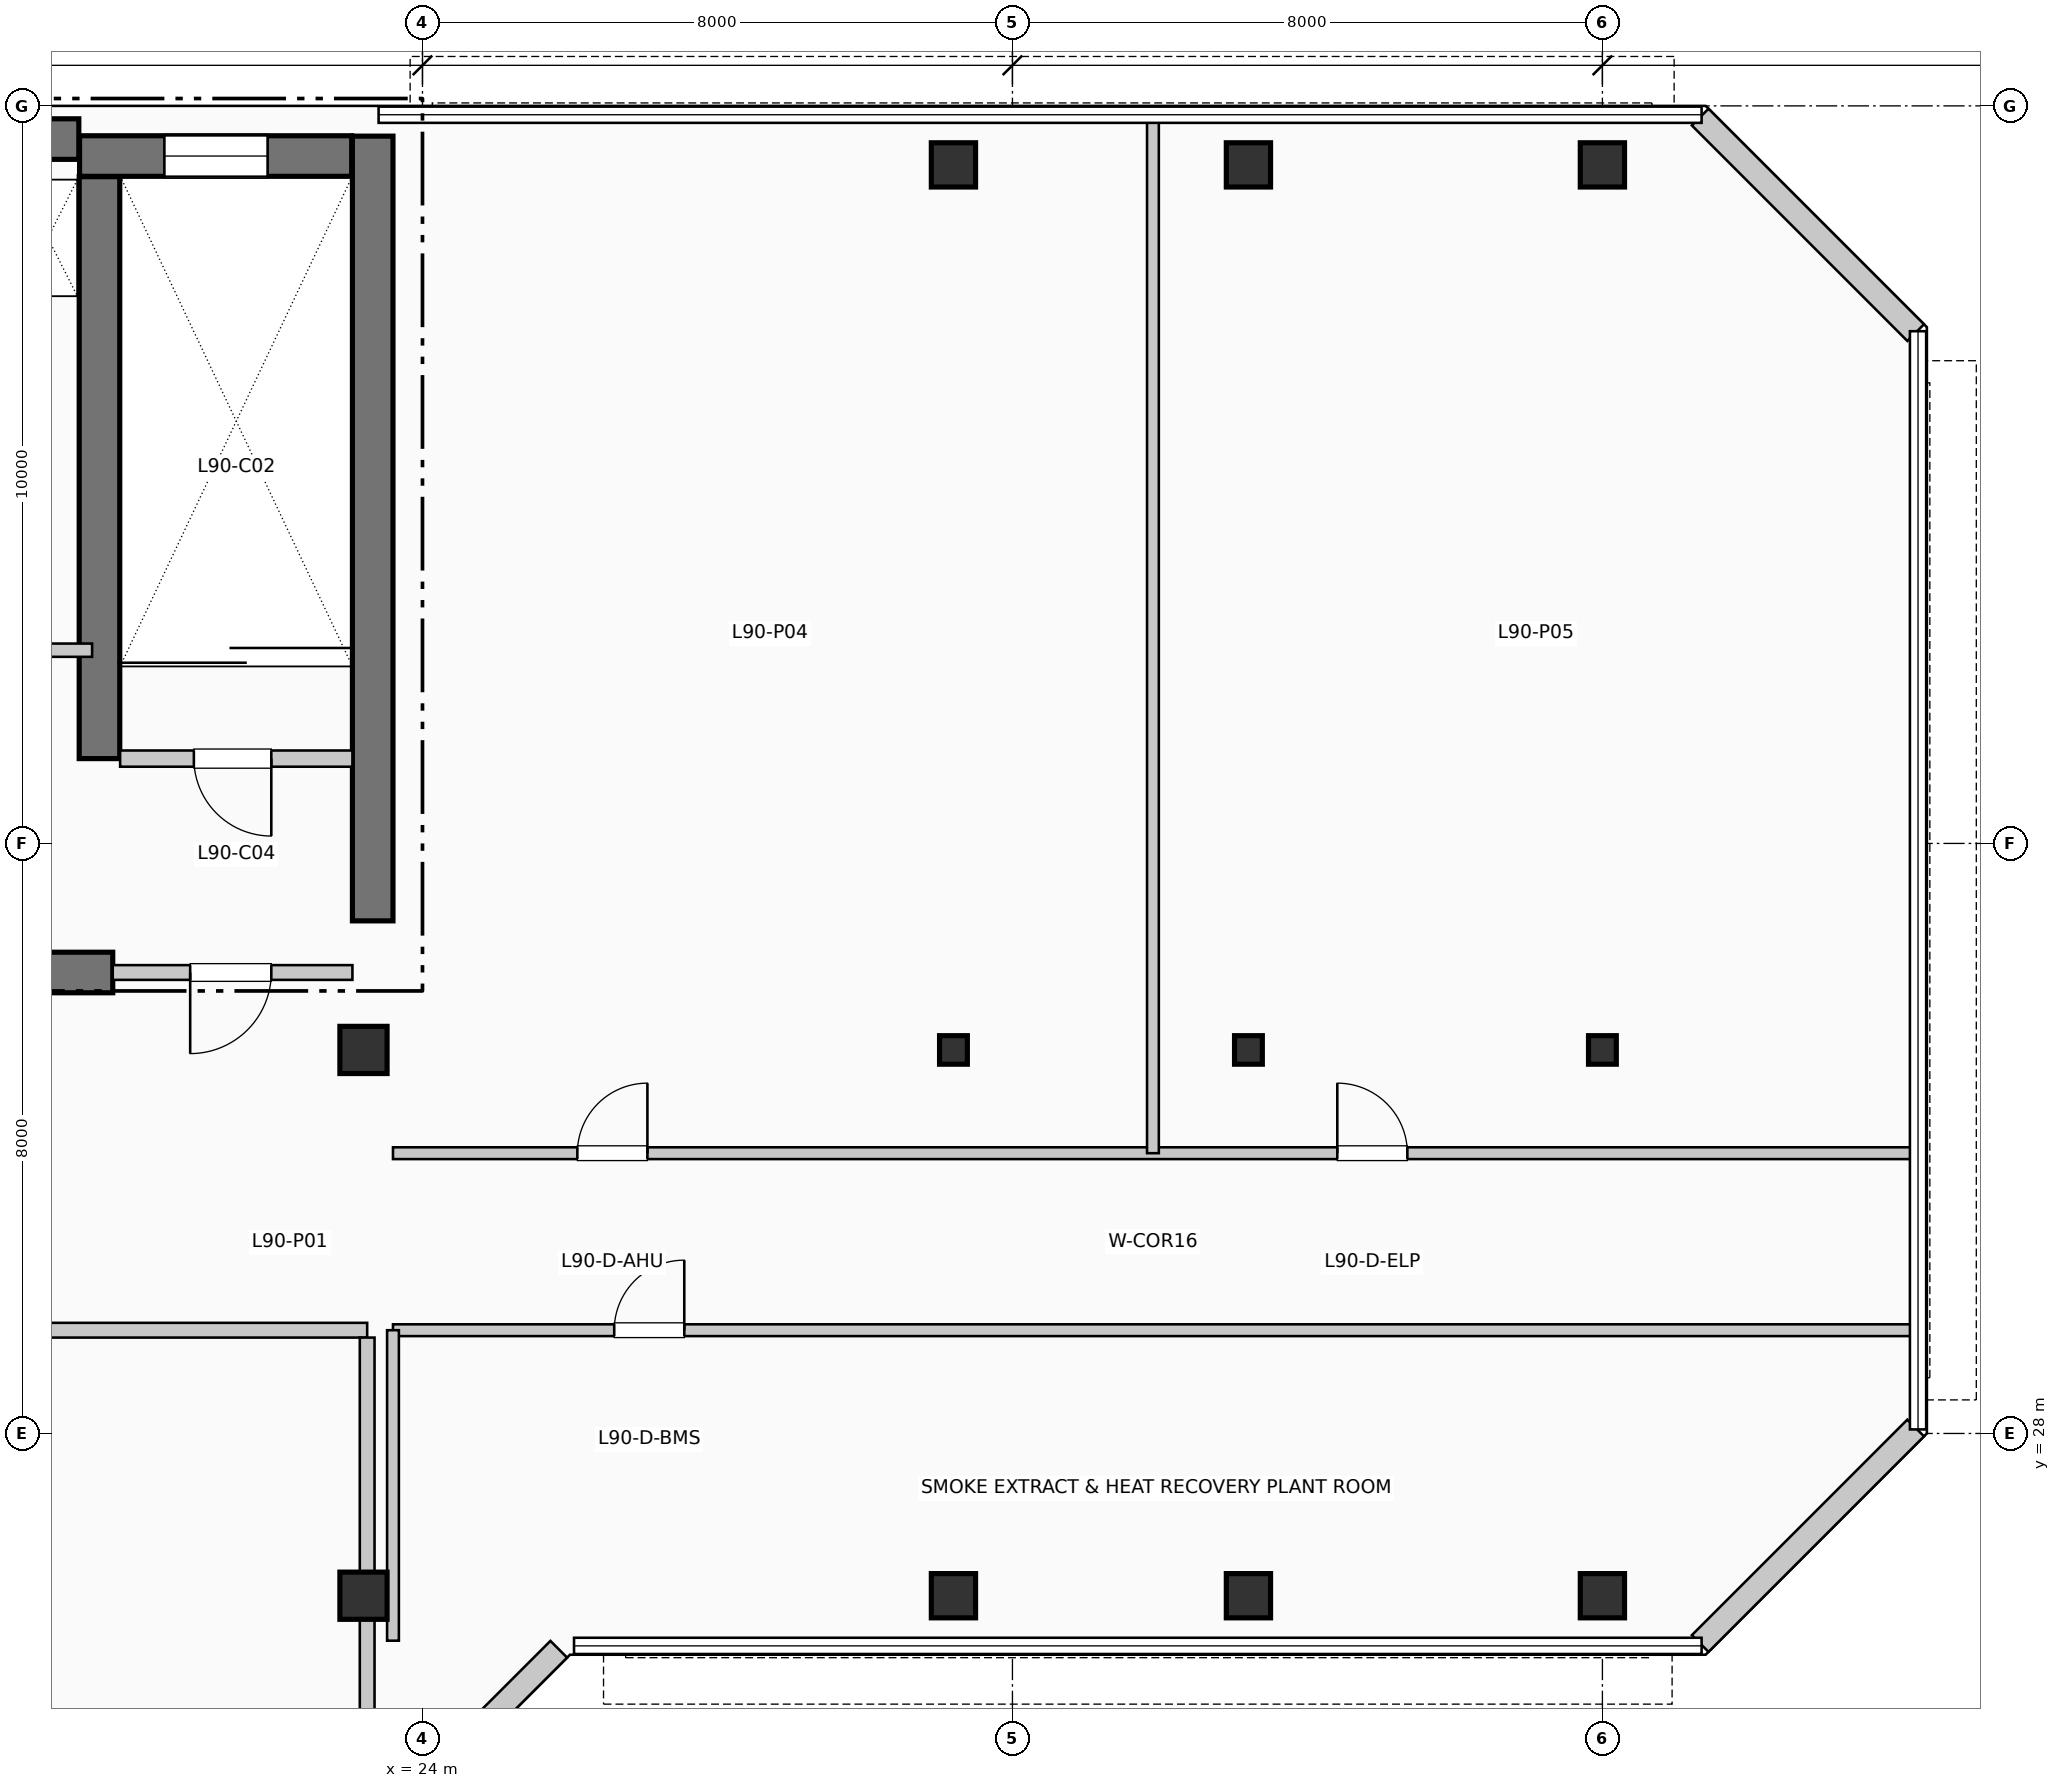
"""IFC4 building model, lengths in metres.
Left out: names, types, materials, properties, quantities, classifications, styles, units other than length and angle.
Written with IfcOpenShell. Run it as: python <this file> out.ifc"""

import sys

from ifc_helpers import new_model, si_unit, direction, frame, frame_2d, origin, origin_2d, place, context, subcontext, project, spatial, rectangle, i_section, extrude, element, fill, save


model = new_model("IFC4")
c1 = context("Model", 3, precision=1e-05, world=origin(), true_north=direction((0.0, 1.0)))
c2 = subcontext(c1, "Body", "Model", "MODEL_VIEW")
j1 = project(units=[si_unit("LENGTHUNIT", "METRE"), si_unit("PLANEANGLEUNIT", "RADIAN")], contexts=[c1])
p1 = place(None, origin())
s1 = spatial("IfcSite", under=j1, at=p1, CompositionType="ELEMENT")
p2 = place(p1, origin())
s2 = spatial("IfcBuilding", under=s1, at=p2, CompositionType="ELEMENT")
p3 = place(p2, frame((0.0, 0.0, 369.93)))
s3 = spatial("IfcBuildingStorey", under=s2, at=p3, CompositionType="ELEMENT", Elevation=369.93)
p4 = place(p3, frame((5.36, 45.55, 0.0), z_axis=(0.0, 0.0, 1.0), x_axis=(1.0, 0.0, 0.0)))
e1 = element("IfcWall", 1, at=p4, inside=s3, PredefinedType="SHEAR", context=c2, shape_type="SweptSolid", body=[
    extrude(rectangle(XDim=13.98, YDim=0.55, at=frame_2d((6.99, 0.0))), origin(), (0.0, 0.0, 1.0), 3.96),
])
p5 = place(p3, frame((23.325, 34.95, 0.0), z_axis=(0.0, 0.0, 1.0), x_axis=(0.0, 1.0, 0.0)))
e2 = element("IfcWall", 2, at=p5, inside=s3, PredefinedType="SHEAR", context=c2, shape_type="SweptSolid", body=[
    extrude(rectangle(XDim=10.64, YDim=0.55, at=frame_2d((5.32, 0.0))), origin(), (0.0, 0.0, 1.0), 3.96),
])
p6 = place(p3, frame((13.68, 34.25, 0.0), z_axis=(0.0, 0.0, 1.0), x_axis=(1.0, 0.0, 0.0)))
e3 = element("IfcWall", 3, at=p6, inside=s3, PredefinedType="SHEAR", context=c2, shape_type="SweptSolid", body=[
    extrude(rectangle(XDim=6.12, YDim=0.55, at=frame_2d((3.06, 0.0))), origin(), (0.0, 0.0, 1.0), 3.96),
])
p7 = place(p3, frame((19.62, 37.15, 0.0), z_axis=(0.0, 0.0, 1.0), x_axis=(0.0, 1.0, 0.0)))
e4 = element("IfcWall", 4, at=p7, inside=s3, PredefinedType="SHEAR", context=c2, shape_type="SweptSolid", body=[
    extrude(rectangle(XDim=7.89, YDim=0.55, at=frame_2d((3.945, 0.0))), origin(), (0.0, 0.0, 1.0), 3.96),
])
p8 = place(p3, frame((19.35, 45.32, 0.0), z_axis=(0.0, 0.0, 1.0), x_axis=(1.0, 0.0, 0.0)))
e5 = element("IfcWall", 5, at=p8, inside=s3, PredefinedType="SHEAR", context=c2, shape_type="SweptSolid", body=[
    extrude(rectangle(XDim=3.69, YDim=0.55, at=frame_2d((1.845, 0.0))), origin(), (0.0, 0.0, 1.0), 3.96),
])
p9 = place(p8, frame((1.15, 0.0, 1.05)))
e6 = element("IfcOpeningElement", 6, at=p9, cuts=e5, PredefinedType="OPENING", context=c2, shape_type="SweptSolid", body=[
    extrude(rectangle(XDim=1.4, YDim=1.8, at=frame_2d((0.7, 0.9))), frame((0.0, 0.285, 0.0), z_axis=(0.0, -1.0, 0.0), x_axis=(1.0, 0.0, 0.0)), (0.0, 0.0, 1.0), 0.57),
])
for number, where, z_axis, x_axis in (
    (7, (23.2, 25.8, 0.0), (0.0, 0.0, 1.0), (1.0, 0.0, 0.0)),
    (8, (23.2, 33.2, 0.0), (0.0, 0.0, 1.0), (1.0, 0.0, 0.0)),
):
    element("IfcColumn", number, at=place(p3, frame(where, z_axis=z_axis, x_axis=x_axis)), inside=s3, PredefinedType="COLUMN", context=c2, shape_type="SweptSolid", body=[
        extrude(rectangle(XDim=0.64, YDim=0.64, at=origin_2d()), origin(), (0.0, 0.0, 1.0), 3.96),
    ])
p10 = place(p3, frame((31.2, 25.8, 0.0), z_axis=(0.0, 0.0, 1.0), x_axis=(1.0, 0.0, 0.0)))
e9 = element("IfcColumn", 9, at=p10, inside=s3, PredefinedType="COLUMN", context=c2, shape_type="SweptSolid", body=[
    extrude(rectangle(XDim=0.6, YDim=0.6, at=origin_2d()), origin(), (0.0, 0.0, 1.0), 3.96),
])
p11 = place(p3, frame((31.2, 33.2, 0.0), z_axis=(0.0, 0.0, 1.0), x_axis=(1.0, 0.0, 0.0)))
e10 = element("IfcColumn", 10, at=p11, inside=s3, PredefinedType="COLUMN", context=c2, shape_type="SweptSolid", body=[
    extrude(i_section(OverallWidth=0.377, OverallDepth=0.387, WebThickness=0.016, FlangeThickness=0.027, at=origin_2d()), origin(), (0.0, 0.0, 1.0), 3.96),
])
for number, where, z_axis, x_axis in (
    (11, (31.2, 45.2, 0.0), (0.0, 0.0, 1.0), (1.0, 0.0, 0.0)),
    (12, (35.2, 25.8, 0.0), (0.0, 0.0, 1.0), (1.0, 0.0, 0.0)),
):
    element("IfcColumn", number, at=place(p3, frame(where, z_axis=z_axis, x_axis=x_axis)), inside=s3, PredefinedType="COLUMN", context=c2, shape_type="SweptSolid", body=[
        extrude(rectangle(XDim=0.6, YDim=0.6, at=origin_2d()), origin(), (0.0, 0.0, 1.0), 3.96),
    ])
p12 = place(p3, frame((35.2, 33.2, 0.0), z_axis=(0.0, 0.0, 1.0), x_axis=(1.0, 0.0, 0.0)))
e13 = element("IfcColumn", 13, at=p12, inside=s3, PredefinedType="COLUMN", context=c2, shape_type="SweptSolid", body=[
    extrude(i_section(OverallWidth=0.377, OverallDepth=0.387, WebThickness=0.016, FlangeThickness=0.027, at=origin_2d()), origin(), (0.0, 0.0, 1.0), 3.96),
])
for number, where, z_axis, x_axis in (
    (14, (35.2, 45.2, 0.0), (0.0, 0.0, 1.0), (1.0, 0.0, 0.0)),
    (15, (40.0, 25.8, 0.0), (0.0, 0.0, 1.0), (1.0, 0.0, 0.0)),
):
    element("IfcColumn", number, at=place(p3, frame(where, z_axis=z_axis, x_axis=x_axis)), inside=s3, PredefinedType="COLUMN", context=c2, shape_type="SweptSolid", body=[
        extrude(rectangle(XDim=0.6, YDim=0.6, at=origin_2d()), origin(), (0.0, 0.0, 1.0), 3.96),
    ])
p13 = place(p3, frame((40.0, 33.2, 0.0), z_axis=(0.0, 0.0, 1.0), x_axis=(1.0, 0.0, 0.0)))
e16 = element("IfcColumn", 16, at=p13, inside=s3, PredefinedType="COLUMN", context=c2, shape_type="SweptSolid", body=[
    extrude(i_section(OverallWidth=0.377, OverallDepth=0.387, WebThickness=0.016, FlangeThickness=0.027, at=origin_2d()), origin(), (0.0, 0.0, 1.0), 3.96),
])
p14 = place(p3, frame((40.0, 45.2, 0.0), z_axis=(0.0, 0.0, 1.0), x_axis=(1.0, 0.0, 0.0)))
e17 = element("IfcColumn", 17, at=p14, inside=s3, PredefinedType="COLUMN", context=c2, shape_type="SweptSolid", body=[
    extrude(rectangle(XDim=0.6, YDim=0.6, at=origin_2d()), origin(), (0.0, 0.0, 1.0), 3.96),
])
p15 = place(p3, frame((23.926, 23.152, 0.0), z_axis=(0.0, 0.0, 1.0), x_axis=(0.707106781187, 0.707106781187, 0.0)))
e18 = element("IfcWall", 18, at=p15, inside=s3, PredefinedType="SOLIDWALL", context=c2, shape_type="SweptSolid", body=[
    extrude(rectangle(XDim=2.718, YDim=0.32, at=frame_2d((1.359, 0.0))), origin(), (0.0, 0.0, 1.0), 3.96),
])
for number, where, z_axis, x_axis in (
    (19, (41.326, 25.152, 0.0), (0.0, 0.0, 1.0), (0.707, 0.707, 0.0)),
    (20, (44.248, 42.926, 0.0), (0.0, 0.0, 1.0), (-0.707, 0.707, 0.0)),
):
    element("IfcWall", number, at=place(p3, frame(where, z_axis=z_axis, x_axis=x_axis)), inside=s3, PredefinedType="SOLIDWALL", context=c2, shape_type="SweptSolid", body=[
        extrude(rectangle(XDim=4.133, YDim=0.32, at=frame_2d((2.066, 0.0))), origin(), (0.0, 0.0, 1.0), 3.96),
    ])
p16 = place(p3, frame((19.9, 37.15, 0.0), z_axis=(0.0, 0.0, 1.0), x_axis=(1.0, 0.0, 0.0)))
e21 = element("IfcWall", 21, at=p16, inside=s3, PredefinedType="PARTITIONING", context=c2, shape_type="SweptSolid", body=[
    extrude(rectangle(XDim=3.15, YDim=0.22, at=frame_2d((1.575, 0.0))), origin(), (0.0, 0.0, 1.0), 3.96),
])
p17 = place(p16, frame((2.05, 0.0, 0.0), z_axis=(0.0, 0.0, 1.0), x_axis=(-1.0, 0.0, 0.0)))
e22 = element("IfcOpeningElement", 22, at=p17, cuts=e21, PredefinedType="OPENING", context=c2, shape_type="SweptSolid", body=[
    extrude(rectangle(XDim=1.05, YDim=2.15, at=frame_2d((0.525, 1.075))), frame((0.0, 0.12, 0.0), z_axis=(0.0, -1.0, 0.0), x_axis=(1.0, 0.0, 0.0)), (0.0, 0.0, 1.0), 0.24),
])
p18 = place(p3, frame((19.8, 34.25, 0.0), z_axis=(0.0, 0.0, 1.0), x_axis=(1.0, 0.0, 0.0)))
e23 = element("IfcWall", 23, at=p18, inside=s3, PredefinedType="PARTITIONING", context=c2, shape_type="SweptSolid", body=[
    extrude(rectangle(XDim=3.25, YDim=0.2, at=frame_2d((1.625, 0.0))), origin(), (0.0, 0.0, 1.0), 3.96),
])
p19 = place(p18, frame((2.15, 0.0, 0.0), z_axis=(0.0, 0.0, 1.0), x_axis=(-1.0, 0.0, 0.0)))
e24 = element("IfcOpeningElement", 24, at=p19, cuts=e23, PredefinedType="OPENING", context=c2, shape_type="SweptSolid", body=[
    extrude(rectangle(XDim=1.1, YDim=2.15, at=frame_2d((0.55, 1.075))), frame((0.0, 0.11, 0.0), z_axis=(0.0, -1.0, 0.0), x_axis=(1.0, 0.0, 0.0)), (0.0, 0.0, 1.0), 0.22),
])
p20 = place(p3, frame((17.68, 38.62, 0.0), z_axis=(0.0, 0.0, 1.0), x_axis=(1.0, 0.0, 0.0)))
e25 = element("IfcWall", 25, at=p20, inside=s3, PredefinedType="PARTITIONING", context=c2, shape_type="SweptSolid", body=[
    extrude(rectangle(XDim=1.84, YDim=0.18, at=frame_2d((0.92, 0.0))), origin(), (0.0, 0.0, 1.0), 3.96),
])
p21 = place(p20, frame((0.24, 0.0, 0.0)))
e26 = element("IfcOpeningElement", 26, at=p21, cuts=e25, PredefinedType="OPENING", context=c2, shape_type="SweptSolid", body=[
    extrude(rectangle(XDim=0.92, YDim=2.1, at=frame_2d((0.46, 1.05))), frame((0.0, 0.1, 0.0), z_axis=(0.0, -1.0, 0.0), x_axis=(1.0, 0.0, 0.0)), (0.0, 0.0, 1.0), 0.2),
])
p22 = place(p3, frame((0.19, 29.4, 0.0), z_axis=(0.0, 0.0, 1.0), x_axis=(1.0, 0.0, 0.0)))
e27 = element("IfcWall", 27, at=p22, inside=s3, PredefinedType="PARTITIONING", context=c2, shape_type="SweptSolid", body=[
    extrude(rectangle(XDim=23.06, YDim=0.2, at=frame_2d((11.53, 0.0))), origin(), (0.0, 0.0, 1.0), 3.385),
])
p23 = place(p22, frame((3.8, 0.0, 0.0)))
e28 = element("IfcOpeningElement", 28, at=p23, cuts=e27, PredefinedType="OPENING", context=c2, shape_type="SweptSolid", body=[
    extrude(rectangle(XDim=1.1, YDim=2.15, at=frame_2d((0.55, 1.075))), frame((0.0, 0.11, 0.0), z_axis=(0.0, -1.0, 0.0), x_axis=(1.0, 0.0, 0.0)), (0.0, 0.0, 1.0), 0.22),
])
p24 = place(p22, frame((14.5, 0.0, 0.0)))
e29 = element("IfcOpeningElement", 29, at=p24, cuts=e27, PredefinedType="OPENING", context=c2, shape_type="SweptSolid", body=[
    extrude(rectangle(XDim=1.1, YDim=2.15, at=frame_2d((0.55, 1.075))), frame((0.0, 0.11, 0.0), z_axis=(0.0, -1.0, 0.0), x_axis=(1.0, 0.0, 0.0)), (0.0, 0.0, 1.0), 0.22),
])
p25 = place(p3, frame((23.25, 11.79, 0.0), z_axis=(0.0, 0.0, 1.0), x_axis=(0.0, 1.0, 0.0)))
e30 = element("IfcWall", 30, at=p25, inside=s3, PredefinedType="PARTITIONING", context=c2, shape_type="SweptSolid", body=[
    extrude(rectangle(XDim=17.51, YDim=0.2, at=frame_2d((8.755, 0.0))), origin(), (0.0, 0.0, 1.0), 3.185),
])
p26 = place(p3, frame((23.6, 31.8, 0.0), z_axis=(0.0, 0.0, 1.0), x_axis=(1.0, 0.0, 0.0)))
e31 = element("IfcWall", 31, at=p26, inside=s3, PredefinedType="PARTITIONING", context=c2, shape_type="SweptSolid", body=[
    extrude(rectangle(XDim=20.61, YDim=0.16, at=frame_2d((10.305, 0.0))), origin(), (0.0, 0.0, 1.0), 3.96),
])
p27 = place(p26, frame((2.5, 0.0, 0.0)))
e32 = element("IfcOpeningElement", 32, at=p27, cuts=e31, PredefinedType="OPENING", context=c2, shape_type="SweptSolid", body=[
    extrude(rectangle(XDim=0.95, YDim=2.1, at=frame_2d((0.475, 1.05))), frame((0.0, 0.09, 0.0), z_axis=(0.0, -1.0, 0.0), x_axis=(1.0, 0.0, 0.0)), (0.0, 0.0, 1.0), 0.18),
])
p28 = place(p26, frame((12.805, 0.0, 0.0)))
e33 = element("IfcOpeningElement", 33, at=p28, cuts=e31, PredefinedType="OPENING", context=c2, shape_type="SweptSolid", body=[
    extrude(rectangle(XDim=0.95, YDim=2.1, at=frame_2d((0.475, 1.05))), frame((0.0, 0.09, 0.0), z_axis=(0.0, -1.0, 0.0), x_axis=(1.0, 0.0, 0.0)), (0.0, 0.0, 1.0), 0.18),
])
p29 = place(p3, frame((33.905, 31.8, 0.0), z_axis=(0.0, 0.0, 1.0), x_axis=(0.0, 1.0, 0.0)))
e34 = element("IfcWall", 34, at=p29, inside=s3, PredefinedType="PARTITIONING", context=c2, shape_type="SweptSolid", body=[
    extrude(rectangle(XDim=14.01, YDim=0.16, at=frame_2d((7.005, 0.0))), origin(), (0.0, 0.0, 1.0), 3.96),
])
p30 = place(p3, frame((23.6, 29.4, 0.0), z_axis=(0.0, 0.0, 1.0), x_axis=(1.0, 0.0, 0.0)))
e35 = element("IfcWall", 35, at=p30, inside=s3, PredefinedType="PARTITIONING", context=c2, shape_type="SweptSolid", body=[
    extrude(rectangle(XDim=20.61, YDim=0.16, at=frame_2d((10.305, 0.0))), origin(), (0.0, 0.0, 1.0), 3.385),
])
p31 = place(p30, frame((3.0, 0.0, 0.0)))
e36 = element("IfcOpeningElement", 36, at=p31, cuts=e35, PredefinedType="OPENING", context=c2, shape_type="SweptSolid", body=[
    extrude(rectangle(XDim=0.95, YDim=2.1, at=frame_2d((0.475, 1.05))), frame((0.0, 0.09, 0.0), z_axis=(0.0, -1.0, 0.0), x_axis=(1.0, 0.0, 0.0)), (0.0, 0.0, 1.0), 0.18),
])
p32 = place(p3, frame((23.6, 25.19, 0.0), z_axis=(0.0, 0.0, 1.0), x_axis=(0.0, 1.0, 0.0)))
e37 = element("IfcWall", 37, at=p32, inside=s3, PredefinedType="PARTITIONING", context=c2, shape_type="SweptSolid", body=[
    extrude(rectangle(XDim=4.21, YDim=0.16, at=frame_2d((2.105, 0.0))), origin(), (0.0, 0.0, 1.0), 3.185),
])
p33 = place(p9, origin())
e38 = element("IfcWindow", 38, at=p33, inside=s3, PartitioningType="SINGLE_PANEL", PredefinedType="WINDOW", context=c2, shape_type="SweptSolid", body=[
    extrude(rectangle(XDim=1.4, YDim=1.8, at=frame_2d((0.7, 0.9))), frame((0.0, 0.03, 0.0), z_axis=(0.0, -1.0, 0.0), x_axis=(1.0, 0.0, 0.0)), (0.0, 0.0, 1.0), 0.06),
])
fill(e6, e38)
p34 = place(p17, origin())
e39 = element("IfcDoor", 39, at=p34, inside=s3, OperationType="SINGLE_SWING_RIGHT", PredefinedType="DOOR", context=c2, shape_type="SweptSolid", body=[
    extrude(rectangle(XDim=1.05, YDim=2.15, at=frame_2d((0.525, 1.075))), frame((0.0, 0.025, 0.0), z_axis=(0.0, -1.0, 0.0), x_axis=(1.0, 0.0, 0.0)), (0.0, 0.0, 1.0), 0.05),
])
fill(e22, e39)
p35 = place(p19, origin())
e40 = element("IfcDoor", 40, at=p35, inside=s3, OperationType="SINGLE_SWING_LEFT", PredefinedType="DOOR", context=c2, shape_type="SweptSolid", body=[
    extrude(rectangle(XDim=1.1, YDim=2.15, at=frame_2d((0.55, 1.075))), frame((0.0, 0.025, 0.0), z_axis=(0.0, -1.0, 0.0), x_axis=(1.0, 0.0, 0.0)), (0.0, 0.0, 1.0), 0.05),
])
fill(e24, e40)
p36 = place(p27, origin())
e41 = element("IfcDoor", 41, at=p36, inside=s3, OperationType="SINGLE_SWING_RIGHT", PredefinedType="DOOR", context=c2, shape_type="SweptSolid", body=[
    extrude(rectangle(XDim=0.95, YDim=2.1, at=frame_2d((0.475, 1.05))), frame((0.0, 0.025, 0.0), z_axis=(0.0, -1.0, 0.0), x_axis=(1.0, 0.0, 0.0)), (0.0, 0.0, 1.0), 0.05),
])
fill(e32, e41)
p37 = place(p28, origin())
e42 = element("IfcDoor", 42, at=p37, inside=s3, OperationType="SINGLE_SWING_LEFT", PredefinedType="DOOR", context=c2, shape_type="SweptSolid", body=[
    extrude(rectangle(XDim=0.95, YDim=2.1, at=frame_2d((0.475, 1.05))), frame((0.0, 0.025, 0.0), z_axis=(0.0, -1.0, 0.0), x_axis=(1.0, 0.0, 0.0)), (0.0, 0.0, 1.0), 0.05),
])
fill(e33, e42)
p38 = place(p31, origin())
e43 = element("IfcDoor", 43, at=p38, inside=s3, OperationType="SINGLE_SWING_RIGHT", PredefinedType="DOOR", context=c2, shape_type="SweptSolid", body=[
    extrude(rectangle(XDim=0.95, YDim=2.1, at=frame_2d((0.475, 1.05))), frame((0.0, 0.025, 0.0), z_axis=(0.0, -1.0, 0.0), x_axis=(1.0, 0.0, 0.0)), (0.0, 0.0, 1.0), 0.05),
])
fill(e36, e43)
save(model, sys.argv[1])
